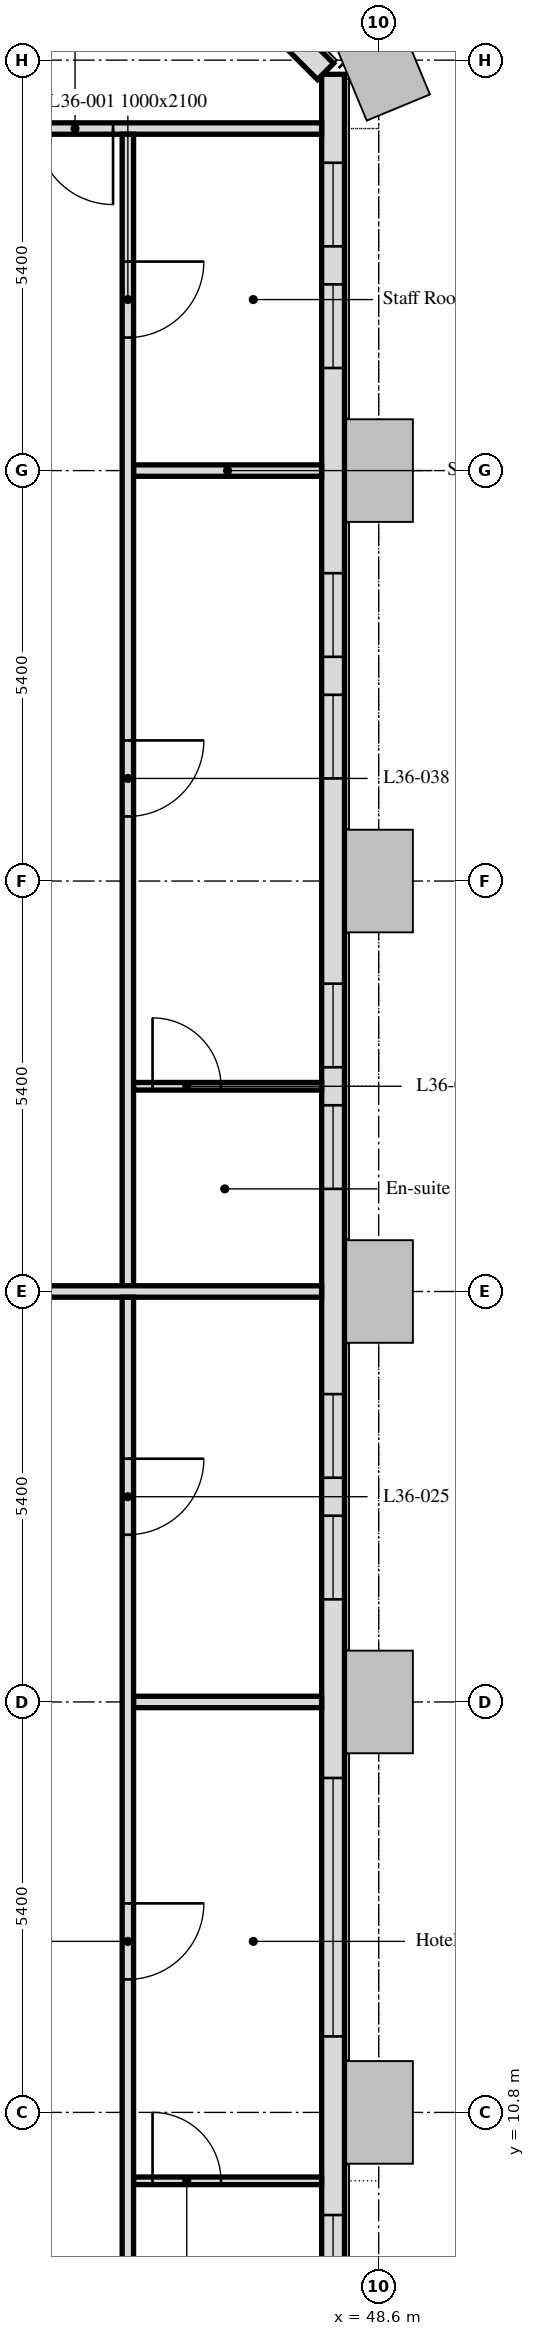
"""IFC4 building model, lengths in metres.
Left out: names, types, materials, properties, quantities, classifications, styles, units other than length and angle.
Written with IfcOpenShell. Run it as: python <this file> out.ifc"""

import sys

from ifc_helpers import new_model, si_unit, direction, frame, frame_2d, origin, place, context, subcontext, project, spatial, rectangle, extrude, element, fill, save


model = new_model("IFC4")
c1 = context("Model", 3, precision=1e-05, world=origin(), true_north=direction((0.0, 1.0)))
c2 = subcontext(c1, "Body", "Model", "MODEL_VIEW")
j1 = project(units=[si_unit("LENGTHUNIT", "METRE"), si_unit("PLANEANGLEUNIT", "RADIAN")], contexts=[c1])
p1 = place(None, origin())
s1 = spatial("IfcSite", under=j1, at=p1, CompositionType="ELEMENT")
p2 = place(p1, origin())
s2 = spatial("IfcBuilding", under=s1, at=p2, CompositionType="ELEMENT")
p3 = place(p2, frame((0.0, 0.0, 156.1)))
s3 = spatial("IfcBuildingStorey", under=s2, at=p3, CompositionType="ELEMENT", Elevation=156.1)
p4 = place(p3, frame((48.0, 5.586, 0.0), z_axis=(0.0, 0.0, 1.0), x_axis=(0.0, 1.0, 0.0)))
e1 = element("IfcWall", 1, at=p4, inside=s3, PredefinedType="SOLIDWALL", context=c2, shape_type="SweptSolid", body=[
    extrude(rectangle(XDim=32.027, YDim=0.3, at=frame_2d((16.014, 0.0))), origin(), (0.0, 0.0, 1.0), 3.0),
])
p5 = place(p4, frame((1.789, 0.0, 0.9)))
e2 = element("IfcOpeningElement", 2, at=p5, cuts=e1, PredefinedType="OPENING", context=c2, shape_type="SweptSolid", body=[
    extrude(rectangle(XDim=0.65, YDim=1.7, at=frame_2d((0.325, 0.85))), frame((0.0, 0.16, 0.0), z_axis=(0.0, -1.0, 0.0), x_axis=(1.0, 0.0, 0.0)), (0.0, 0.0, 1.0), 0.32),
])
p6 = place(p4, frame((2.764, 0.0, 0.9)))
e3 = element("IfcOpeningElement", 3, at=p6, cuts=e1, PredefinedType="OPENING", context=c2, shape_type="SweptSolid", body=[
    extrude(rectangle(XDim=1.1, YDim=1.7, at=frame_2d((0.55, 0.85))), frame((0.0, 0.16, 0.0), z_axis=(0.0, -1.0, 0.0), x_axis=(1.0, 0.0, 0.0)), (0.0, 0.0, 1.0), 0.32),
])
p7 = place(p4, frame((6.214, 0.0, 0.9)))
e4 = element("IfcOpeningElement", 4, at=p7, cuts=e1, PredefinedType="OPENING", context=c2, shape_type="SweptSolid", body=[
    extrude(rectangle(XDim=3.4, YDim=1.7, at=frame_2d((1.7, 0.85))), frame((0.0, 0.16, 0.0), z_axis=(0.0, -1.0, 0.0), x_axis=(1.0, 0.0, 0.0)), (0.0, 0.0, 1.0), 0.32),
])
p8 = place(p4, frame((11.964, 0.0, 0.9)))
e5 = element("IfcOpeningElement", 5, at=p8, cuts=e1, PredefinedType="OPENING", context=c2, shape_type="SweptSolid", body=[
    extrude(rectangle(XDim=1.1, YDim=1.7, at=frame_2d((0.55, 0.85))), frame((0.0, 0.16, 0.0), z_axis=(0.0, -1.0, 0.0), x_axis=(1.0, 0.0, 0.0)), (0.0, 0.0, 1.0), 0.32),
])
p9 = place(p4, frame((13.564, 0.0, 0.9)))
e6 = element("IfcOpeningElement", 6, at=p9, cuts=e1, PredefinedType="OPENING", context=c2, shape_type="SweptSolid", body=[
    extrude(rectangle(XDim=1.1, YDim=1.7, at=frame_2d((0.55, 0.85))), frame((0.0, 0.16, 0.0), z_axis=(0.0, -1.0, 0.0), x_axis=(1.0, 0.0, 0.0)), (0.0, 0.0, 1.0), 0.32),
])
p10 = place(p4, frame((17.364, 0.0, 0.9)))
e7 = element("IfcOpeningElement", 7, at=p10, cuts=e1, PredefinedType="OPENING", context=c2, shape_type="SweptSolid", body=[
    extrude(rectangle(XDim=1.1, YDim=1.7, at=frame_2d((0.55, 0.85))), frame((0.0, 0.16, 0.0), z_axis=(0.0, -1.0, 0.0), x_axis=(1.0, 0.0, 0.0)), (0.0, 0.0, 1.0), 0.32),
])
p11 = place(p4, frame((18.964, 0.0, 0.9)))
e8 = element("IfcOpeningElement", 8, at=p11, cuts=e1, PredefinedType="OPENING", context=c2, shape_type="SweptSolid", body=[
    extrude(rectangle(XDim=1.1, YDim=1.7, at=frame_2d((0.55, 0.85))), frame((0.0, 0.16, 0.0), z_axis=(0.0, -1.0, 0.0), x_axis=(1.0, 0.0, 0.0)), (0.0, 0.0, 1.0), 0.32),
])
p12 = place(p4, frame((22.764, 0.0, 0.9)))
e9 = element("IfcOpeningElement", 9, at=p12, cuts=e1, PredefinedType="OPENING", context=c2, shape_type="SweptSolid", body=[
    extrude(rectangle(XDim=1.1, YDim=1.7, at=frame_2d((0.55, 0.85))), frame((0.0, 0.16, 0.0), z_axis=(0.0, -1.0, 0.0), x_axis=(1.0, 0.0, 0.0)), (0.0, 0.0, 1.0), 0.32),
])
p13 = place(p4, frame((24.364, 0.0, 0.9)))
e10 = element("IfcOpeningElement", 10, at=p13, cuts=e1, PredefinedType="OPENING", context=c2, shape_type="SweptSolid", body=[
    extrude(rectangle(XDim=1.1, YDim=1.7, at=frame_2d((0.55, 0.85))), frame((0.0, 0.16, 0.0), z_axis=(0.0, -1.0, 0.0), x_axis=(1.0, 0.0, 0.0)), (0.0, 0.0, 1.0), 0.32),
])
p14 = place(p4, frame((28.164, 0.0, 0.9)))
e11 = element("IfcOpeningElement", 11, at=p14, cuts=e1, PredefinedType="OPENING", context=c2, shape_type="SweptSolid", body=[
    extrude(rectangle(XDim=1.1, YDim=1.7, at=frame_2d((0.55, 0.85))), frame((0.0, 0.16, 0.0), z_axis=(0.0, -1.0, 0.0), x_axis=(1.0, 0.0, 0.0)), (0.0, 0.0, 1.0), 0.32),
])
p15 = place(p4, frame((29.764, 0.0, 0.9)))
e12 = element("IfcOpeningElement", 12, at=p15, cuts=e1, PredefinedType="OPENING", context=c2, shape_type="SweptSolid", body=[
    extrude(rectangle(XDim=1.1, YDim=1.7, at=frame_2d((0.55, 0.85))), frame((0.0, 0.16, 0.0), z_axis=(0.0, -1.0, 0.0), x_axis=(1.0, 0.0, 0.0)), (0.0, 0.0, 1.0), 0.32),
])
p16 = place(p3, frame((47.901, 37.65, 0.0), z_axis=(0.0, 0.0, 1.0), x_axis=(-0.707106781187, 0.707106781187, 0.0)))
e13 = element("IfcWall", 13, at=p16, inside=s3, PredefinedType="SOLIDWALL", context=c2, shape_type="SweptSolid", body=[
    extrude(rectangle(XDim=6.86, YDim=0.3, at=frame_2d((3.43, 0.0))), origin(), (0.0, 0.0, 1.0), 3.0),
])
p17 = place(p16, frame((1.28, 0.0, 0.9)))
e14 = element("IfcOpeningElement", 14, at=p17, cuts=e13, PredefinedType="OPENING", context=c2, shape_type="SweptSolid", body=[
    extrude(rectangle(XDim=1.1, YDim=1.7, at=frame_2d((0.55, 0.85))), frame((0.0, 0.16, 0.0), z_axis=(0.0, -1.0, 0.0), x_axis=(1.0, 0.0, 0.0)), (0.0, 0.0, 1.0), 0.32),
])
p18 = place(p16, frame((4.48, 0.0, 0.9)))
e15 = element("IfcOpeningElement", 15, at=p18, cuts=e13, PredefinedType="OPENING", context=c2, shape_type="SweptSolid", body=[
    extrude(rectangle(XDim=1.1, YDim=1.7, at=frame_2d((0.55, 0.85))), frame((0.0, 0.16, 0.0), z_axis=(0.0, -1.0, 0.0), x_axis=(1.0, 0.0, 0.0)), (0.0, 0.0, 1.0), 0.32),
])
p19 = place(p3, frame((45.375, 32.4, 0.0), z_axis=(0.0, 0.0, 1.0), x_axis=(1.0, 0.0, 0.0)))
e16 = element("IfcWall", 16, at=p19, inside=s3, PredefinedType="PARTITIONING", context=c2, shape_type="SweptSolid", body=[
    extrude(rectangle(XDim=2.474, YDim=0.15, at=frame_2d((1.237, 0.0))), origin(), (0.0, 0.0, 1.0), 2.4),
])
p20 = place(p3, frame((47.849, 36.9, 0.0), z_axis=(0.0, 0.0, 1.0), x_axis=(-1.0, 0.0, 0.0)))
e17 = element("IfcWall", 17, at=p20, inside=s3, PredefinedType="PARTITIONING", context=c2, shape_type="SweptSolid", body=[
    extrude(rectangle(XDim=41.698, YDim=0.15, at=frame_2d((20.849, 0.0))), origin(), (0.0, 0.0, 1.0), 3.0),
])
p21 = place(p20, frame((39.249, 0.0, 0.0)))
e18 = element("IfcOpeningElement", 18, at=p21, cuts=e17, PredefinedType="OPENING", context=c2, shape_type="SweptSolid", body=[
    extrude(rectangle(XDim=1.0, YDim=2.1, at=frame_2d((0.5, 1.05))), frame((0.0, 0.075, 0.0), z_axis=(0.0, -1.0, 0.0), x_axis=(1.0, 0.0, 0.0)), (0.0, 0.0, 1.0), 0.15),
])
p22 = place(p20, frame((27.649, 0.0, 0.0)))
e19 = element("IfcOpeningElement", 19, at=p22, cuts=e17, PredefinedType="OPENING", context=c2, shape_type="SweptSolid", body=[
    extrude(rectangle(XDim=1.0, YDim=2.1, at=frame_2d((0.5, 1.05))), frame((0.0, 0.075, 0.0), z_axis=(0.0, -1.0, 0.0), x_axis=(1.0, 0.0, 0.0)), (0.0, 0.0, 1.0), 0.15),
])
p23 = place(p20, frame((22.249, 0.0, 0.0)))
e20 = element("IfcOpeningElement", 20, at=p23, cuts=e17, PredefinedType="OPENING", context=c2, shape_type="SweptSolid", body=[
    extrude(rectangle(XDim=1.0, YDim=2.1, at=frame_2d((0.5, 1.05))), frame((0.0, 0.075, 0.0), z_axis=(0.0, -1.0, 0.0), x_axis=(1.0, 0.0, 0.0)), (0.0, 0.0, 1.0), 0.15),
])
p24 = place(p20, frame((16.849, 0.0, 0.0)))
e21 = element("IfcOpeningElement", 21, at=p24, cuts=e17, PredefinedType="OPENING", context=c2, shape_type="SweptSolid", body=[
    extrude(rectangle(XDim=1.0, YDim=2.1, at=frame_2d((0.5, 1.05))), frame((0.0, 0.075, 0.0), z_axis=(0.0, -1.0, 0.0), x_axis=(1.0, 0.0, 0.0)), (0.0, 0.0, 1.0), 0.15),
])
p25 = place(p20, frame((11.449, 0.0, 0.0)))
e22 = element("IfcOpeningElement", 22, at=p25, cuts=e17, PredefinedType="OPENING", context=c2, shape_type="SweptSolid", body=[
    extrude(rectangle(XDim=1.0, YDim=2.1, at=frame_2d((0.5, 1.05))), frame((0.0, 0.075, 0.0), z_axis=(0.0, -1.0, 0.0), x_axis=(1.0, 0.0, 0.0)), (0.0, 0.0, 1.0), 0.15),
])
p26 = place(p20, frame((2.744, 0.0, 0.0)))
e23 = element("IfcOpeningElement", 23, at=p26, cuts=e17, PredefinedType="OPENING", context=c2, shape_type="SweptSolid", body=[
    extrude(rectangle(XDim=1.0, YDim=2.1, at=frame_2d((0.5, 1.05))), frame((0.0, 0.075, 0.0), z_axis=(0.0, -1.0, 0.0), x_axis=(1.0, 0.0, 0.0)), (0.0, 0.0, 1.0), 0.15),
])
p27 = place(p3, frame((45.375, 24.3, 0.0), z_axis=(0.0, 0.0, 1.0), x_axis=(1.0, 0.0, 0.0)))
e24 = element("IfcWall", 24, at=p27, inside=s3, PredefinedType="PARTITIONING", context=c2, shape_type="SweptSolid", body=[
    extrude(rectangle(XDim=2.474, YDim=0.1, at=frame_2d((1.237, 0.0))), origin(), (0.0, 0.0, 1.0), 3.0),
])
p28 = place(p27, frame((0.25, 0.0, 0.0)))
e25 = element("IfcOpeningElement", 25, at=p28, cuts=e24, PredefinedType="OPENING", context=c2, shape_type="SweptSolid", body=[
    extrude(rectangle(XDim=0.9, YDim=2.1, at=frame_2d((0.45, 1.05))), frame((0.0, 0.05, 0.0), z_axis=(0.0, -1.0, 0.0), x_axis=(1.0, 0.0, 0.0)), (0.0, 0.0, 1.0), 0.1),
])
p29 = place(p3, frame((45.3, 36.825, 0.0), z_axis=(0.0, 0.0, 1.0), x_axis=(0.0, -1.0, 0.0)))
e26 = element("IfcWall", 26, at=p29, inside=s3, PredefinedType="PARTITIONING", context=c2, shape_type="SweptSolid", body=[
    extrude(rectangle(XDim=15.15, YDim=0.15, at=frame_2d((7.575, 0.0))), origin(), (0.0, 0.0, 1.0), 2.4),
])
p30 = place(p29, frame((1.675, 0.0, 0.0)))
e27 = element("IfcOpeningElement", 27, at=p30, cuts=e26, PredefinedType="OPENING", context=c2, shape_type="SweptSolid", body=[
    extrude(rectangle(XDim=1.0, YDim=2.1, at=frame_2d((0.5, 1.05))), frame((0.0, 0.075, 0.0), z_axis=(0.0, -1.0, 0.0), x_axis=(1.0, 0.0, 0.0)), (0.0, 0.0, 1.0), 0.15),
])
p31 = place(p29, frame((7.975, 0.0, 0.0)))
e28 = element("IfcOpeningElement", 28, at=p31, cuts=e26, PredefinedType="OPENING", context=c2, shape_type="SweptSolid", body=[
    extrude(rectangle(XDim=1.0, YDim=2.1, at=frame_2d((0.5, 1.05))), frame((0.0, 0.075, 0.0), z_axis=(0.0, -1.0, 0.0), x_axis=(1.0, 0.0, 0.0)), (0.0, 0.0, 1.0), 0.15),
])
p32 = place(p3, frame((43.2, 21.6, 0.0), z_axis=(0.0, 0.0, 1.0), x_axis=(1.0, 0.0, 0.0)))
e29 = element("IfcWall", 29, at=p32, inside=s3, PredefinedType="PARTITIONING", context=c2, shape_type="SweptSolid", body=[
    extrude(rectangle(XDim=4.649, YDim=0.15, at=frame_2d((2.325, 0.0))), origin(), (0.0, 0.0, 1.0), 2.4),
])
p33 = place(p3, frame((47.849, 16.2, 0.0), z_axis=(0.0, 0.0, 1.0), x_axis=(-1.0, 0.0, 0.0)))
e30 = element("IfcWall", 30, at=p33, inside=s3, PredefinedType="PARTITIONING", context=c2, shape_type="SweptSolid", body=[
    extrude(rectangle(XDim=2.474, YDim=0.15, at=frame_2d((1.237, 0.0))), origin(), (0.0, 0.0, 1.0), 2.4),
])
p34 = place(p3, frame((45.375, 9.9, 0.0), z_axis=(0.0, 0.0, 1.0), x_axis=(1.0, 0.0, 0.0)))
e31 = element("IfcWall", 31, at=p34, inside=s3, PredefinedType="PARTITIONING", context=c2, shape_type="SweptSolid", body=[
    extrude(rectangle(XDim=2.474, YDim=0.1, at=frame_2d((1.237, 0.0))), origin(), (0.0, 0.0, 1.0), 3.0),
])
p35 = place(p34, frame((0.25, 0.0, 0.0)))
e32 = element("IfcOpeningElement", 32, at=p35, cuts=e31, PredefinedType="OPENING", context=c2, shape_type="SweptSolid", body=[
    extrude(rectangle(XDim=0.9, YDim=2.1, at=frame_2d((0.45, 1.05))), frame((0.0, 0.05, 0.0), z_axis=(0.0, -1.0, 0.0), x_axis=(1.0, 0.0, 0.0)), (0.0, 0.0, 1.0), 0.1),
])
p36 = place(p3, frame((45.3, 21.525, 0.0), z_axis=(0.0, 0.0, 1.0), x_axis=(0.0, -1.0, 0.0)))
e33 = element("IfcWall", 33, at=p36, inside=s3, PredefinedType="PARTITIONING", context=c2, shape_type="SweptSolid", body=[
    extrude(rectangle(XDim=14.25, YDim=0.15, at=frame_2d((7.125, 0.0))), origin(), (0.0, 0.0, 1.0), 2.4),
])
p37 = place(p36, frame((2.125, 0.0, 0.0)))
e34 = element("IfcOpeningElement", 34, at=p37, cuts=e33, PredefinedType="OPENING", context=c2, shape_type="SweptSolid", body=[
    extrude(rectangle(XDim=1.0, YDim=2.1, at=frame_2d((0.5, 1.05))), frame((0.0, 0.075, 0.0), z_axis=(0.0, -1.0, 0.0), x_axis=(1.0, 0.0, 0.0)), (0.0, 0.0, 1.0), 0.15),
])
p38 = place(p36, frame((7.975, 0.0, 0.0)))
e35 = element("IfcOpeningElement", 35, at=p38, cuts=e33, PredefinedType="OPENING", context=c2, shape_type="SweptSolid", body=[
    extrude(rectangle(XDim=1.0, YDim=2.1, at=frame_2d((0.5, 1.05))), frame((0.0, 0.075, 0.0), z_axis=(0.0, -1.0, 0.0), x_axis=(1.0, 0.0, 0.0)), (0.0, 0.0, 1.0), 0.15),
])
p39 = place(p6, origin())
e36 = element("IfcWindow", 36, at=p39, inside=s3, PartitioningType="SINGLE_PANEL", PredefinedType="WINDOW", context=c2, shape_type="SweptSolid", body=[
    extrude(rectangle(XDim=1.1, YDim=1.7, at=frame_2d((0.55, 0.85))), frame((0.0, 0.03, 0.0), z_axis=(0.0, -1.0, 0.0), x_axis=(1.0, 0.0, 0.0)), (0.0, 0.0, 1.0), 0.06),
])
fill(e3, e36)
p40 = place(p7, origin())
e37 = element("IfcWindow", 37, at=p40, inside=s3, PartitioningType="SINGLE_PANEL", PredefinedType="WINDOW", context=c2, shape_type="SweptSolid", body=[
    extrude(rectangle(XDim=3.4, YDim=1.7, at=frame_2d((1.7, 0.85))), frame((0.0, 0.03, 0.0), z_axis=(0.0, -1.0, 0.0), x_axis=(1.0, 0.0, 0.0)), (0.0, 0.0, 1.0), 0.06),
])
fill(e4, e37)
p41 = place(p8, origin())
e38 = element("IfcWindow", 38, at=p41, inside=s3, PartitioningType="SINGLE_PANEL", PredefinedType="WINDOW", context=c2, shape_type="SweptSolid", body=[
    extrude(rectangle(XDim=1.1, YDim=1.7, at=frame_2d((0.55, 0.85))), frame((0.0, 0.03, 0.0), z_axis=(0.0, -1.0, 0.0), x_axis=(1.0, 0.0, 0.0)), (0.0, 0.0, 1.0), 0.06),
])
fill(e5, e38)
p42 = place(p9, origin())
e39 = element("IfcWindow", 39, at=p42, inside=s3, PartitioningType="SINGLE_PANEL", PredefinedType="WINDOW", context=c2, shape_type="SweptSolid", body=[
    extrude(rectangle(XDim=1.1, YDim=1.7, at=frame_2d((0.55, 0.85))), frame((0.0, 0.03, 0.0), z_axis=(0.0, -1.0, 0.0), x_axis=(1.0, 0.0, 0.0)), (0.0, 0.0, 1.0), 0.06),
])
fill(e6, e39)
p43 = place(p10, origin())
e40 = element("IfcWindow", 40, at=p43, inside=s3, PartitioningType="SINGLE_PANEL", PredefinedType="WINDOW", context=c2, shape_type="SweptSolid", body=[
    extrude(rectangle(XDim=1.1, YDim=1.7, at=frame_2d((0.55, 0.85))), frame((0.0, 0.03, 0.0), z_axis=(0.0, -1.0, 0.0), x_axis=(1.0, 0.0, 0.0)), (0.0, 0.0, 1.0), 0.06),
])
fill(e7, e40)
p44 = place(p11, origin())
e41 = element("IfcWindow", 41, at=p44, inside=s3, PartitioningType="SINGLE_PANEL", PredefinedType="WINDOW", context=c2, shape_type="SweptSolid", body=[
    extrude(rectangle(XDim=1.1, YDim=1.7, at=frame_2d((0.55, 0.85))), frame((0.0, 0.03, 0.0), z_axis=(0.0, -1.0, 0.0), x_axis=(1.0, 0.0, 0.0)), (0.0, 0.0, 1.0), 0.06),
])
fill(e8, e41)
p45 = place(p12, origin())
e42 = element("IfcWindow", 42, at=p45, inside=s3, PartitioningType="SINGLE_PANEL", PredefinedType="WINDOW", context=c2, shape_type="SweptSolid", body=[
    extrude(rectangle(XDim=1.1, YDim=1.7, at=frame_2d((0.55, 0.85))), frame((0.0, 0.03, 0.0), z_axis=(0.0, -1.0, 0.0), x_axis=(1.0, 0.0, 0.0)), (0.0, 0.0, 1.0), 0.06),
])
fill(e9, e42)
p46 = place(p13, origin())
e43 = element("IfcWindow", 43, at=p46, inside=s3, PartitioningType="SINGLE_PANEL", PredefinedType="WINDOW", context=c2, shape_type="SweptSolid", body=[
    extrude(rectangle(XDim=1.1, YDim=1.7, at=frame_2d((0.55, 0.85))), frame((0.0, 0.03, 0.0), z_axis=(0.0, -1.0, 0.0), x_axis=(1.0, 0.0, 0.0)), (0.0, 0.0, 1.0), 0.06),
])
fill(e10, e43)
p47 = place(p14, origin())
e44 = element("IfcWindow", 44, at=p47, inside=s3, PartitioningType="SINGLE_PANEL", PredefinedType="WINDOW", context=c2, shape_type="SweptSolid", body=[
    extrude(rectangle(XDim=1.1, YDim=1.7, at=frame_2d((0.55, 0.85))), frame((0.0, 0.03, 0.0), z_axis=(0.0, -1.0, 0.0), x_axis=(1.0, 0.0, 0.0)), (0.0, 0.0, 1.0), 0.06),
])
fill(e11, e44)
p48 = place(p15, origin())
e45 = element("IfcWindow", 45, at=p48, inside=s3, PartitioningType="SINGLE_PANEL", PredefinedType="WINDOW", context=c2, shape_type="SweptSolid", body=[
    extrude(rectangle(XDim=1.1, YDim=1.7, at=frame_2d((0.55, 0.85))), frame((0.0, 0.03, 0.0), z_axis=(0.0, -1.0, 0.0), x_axis=(1.0, 0.0, 0.0)), (0.0, 0.0, 1.0), 0.06),
])
fill(e12, e45)
p49 = place(p30, origin())
e46 = element("IfcDoor", 46, at=p49, inside=s3, OperationType="SINGLE_SWING_LEFT", PredefinedType="DOOR", context=c2, shape_type="SweptSolid", body=[
    extrude(rectangle(XDim=1.0, YDim=2.1, at=frame_2d((0.5, 1.05))), frame((0.0, 0.025, 0.0), z_axis=(0.0, -1.0, 0.0), x_axis=(1.0, 0.0, 0.0)), (0.0, 0.0, 1.0), 0.05),
])
fill(e27, e46)
p50 = place(p28, origin())
e47 = element("IfcDoor", 47, at=p50, inside=s3, OperationType="SINGLE_SWING_RIGHT", PredefinedType="DOOR", context=c2, shape_type="SweptSolid", body=[
    extrude(rectangle(XDim=0.9, YDim=2.1, at=frame_2d((0.45, 1.05))), frame((0.0, 0.025, 0.0), z_axis=(0.0, -1.0, 0.0), x_axis=(1.0, 0.0, 0.0)), (0.0, 0.0, 1.0), 0.05),
])
fill(e25, e47)
p51 = place(p35, origin())
e48 = element("IfcDoor", 48, at=p51, inside=s3, OperationType="SINGLE_SWING_LEFT", PredefinedType="DOOR", context=c2, shape_type="SweptSolid", body=[
    extrude(rectangle(XDim=0.9, YDim=2.1, at=frame_2d((0.45, 1.05))), frame((0.0, 0.025, 0.0), z_axis=(0.0, -1.0, 0.0), x_axis=(1.0, 0.0, 0.0)), (0.0, 0.0, 1.0), 0.05),
])
fill(e32, e48)
p52 = place(p37, origin())
e49 = element("IfcDoor", 49, at=p52, inside=s3, OperationType="SINGLE_SWING_RIGHT", PredefinedType="DOOR", context=c2, shape_type="SweptSolid", body=[
    extrude(rectangle(XDim=1.0, YDim=2.1, at=frame_2d((0.5, 1.05))), frame((0.0, 0.025, 0.0), z_axis=(0.0, -1.0, 0.0), x_axis=(1.0, 0.0, 0.0)), (0.0, 0.0, 1.0), 0.05),
])
fill(e34, e49)
p53 = place(p26, origin())
e50 = element("IfcDoor", 50, at=p53, inside=s3, OperationType="SINGLE_SWING_RIGHT", PredefinedType="DOOR", context=c2, shape_type="SweptSolid", body=[
    extrude(rectangle(XDim=1.0, YDim=2.1, at=frame_2d((0.5, 1.05))), frame((0.0, 0.025, 0.0), z_axis=(0.0, -1.0, 0.0), x_axis=(1.0, 0.0, 0.0)), (0.0, 0.0, 1.0), 0.05),
])
fill(e23, e50)
p54 = place(p31, origin())
e51 = element("IfcDoor", 51, at=p54, inside=s3, OperationType="SINGLE_SWING_LEFT", PredefinedType="DOOR", context=c2, shape_type="SweptSolid", body=[
    extrude(rectangle(XDim=1.0, YDim=2.1, at=frame_2d((0.5, 1.05))), frame((0.0, 0.025, 0.0), z_axis=(0.0, -1.0, 0.0), x_axis=(1.0, 0.0, 0.0)), (0.0, 0.0, 1.0), 0.05),
])
fill(e28, e51)
p55 = place(p38, origin())
e52 = element("IfcDoor", 52, at=p55, inside=s3, OperationType="SINGLE_SWING_LEFT", PredefinedType="DOOR", context=c2, shape_type="SweptSolid", body=[
    extrude(rectangle(XDim=1.0, YDim=2.1, at=frame_2d((0.5, 1.05))), frame((0.0, 0.025, 0.0), z_axis=(0.0, -1.0, 0.0), x_axis=(1.0, 0.0, 0.0)), (0.0, 0.0, 1.0), 0.05),
])
fill(e35, e52)
save(model, sys.argv[1])
